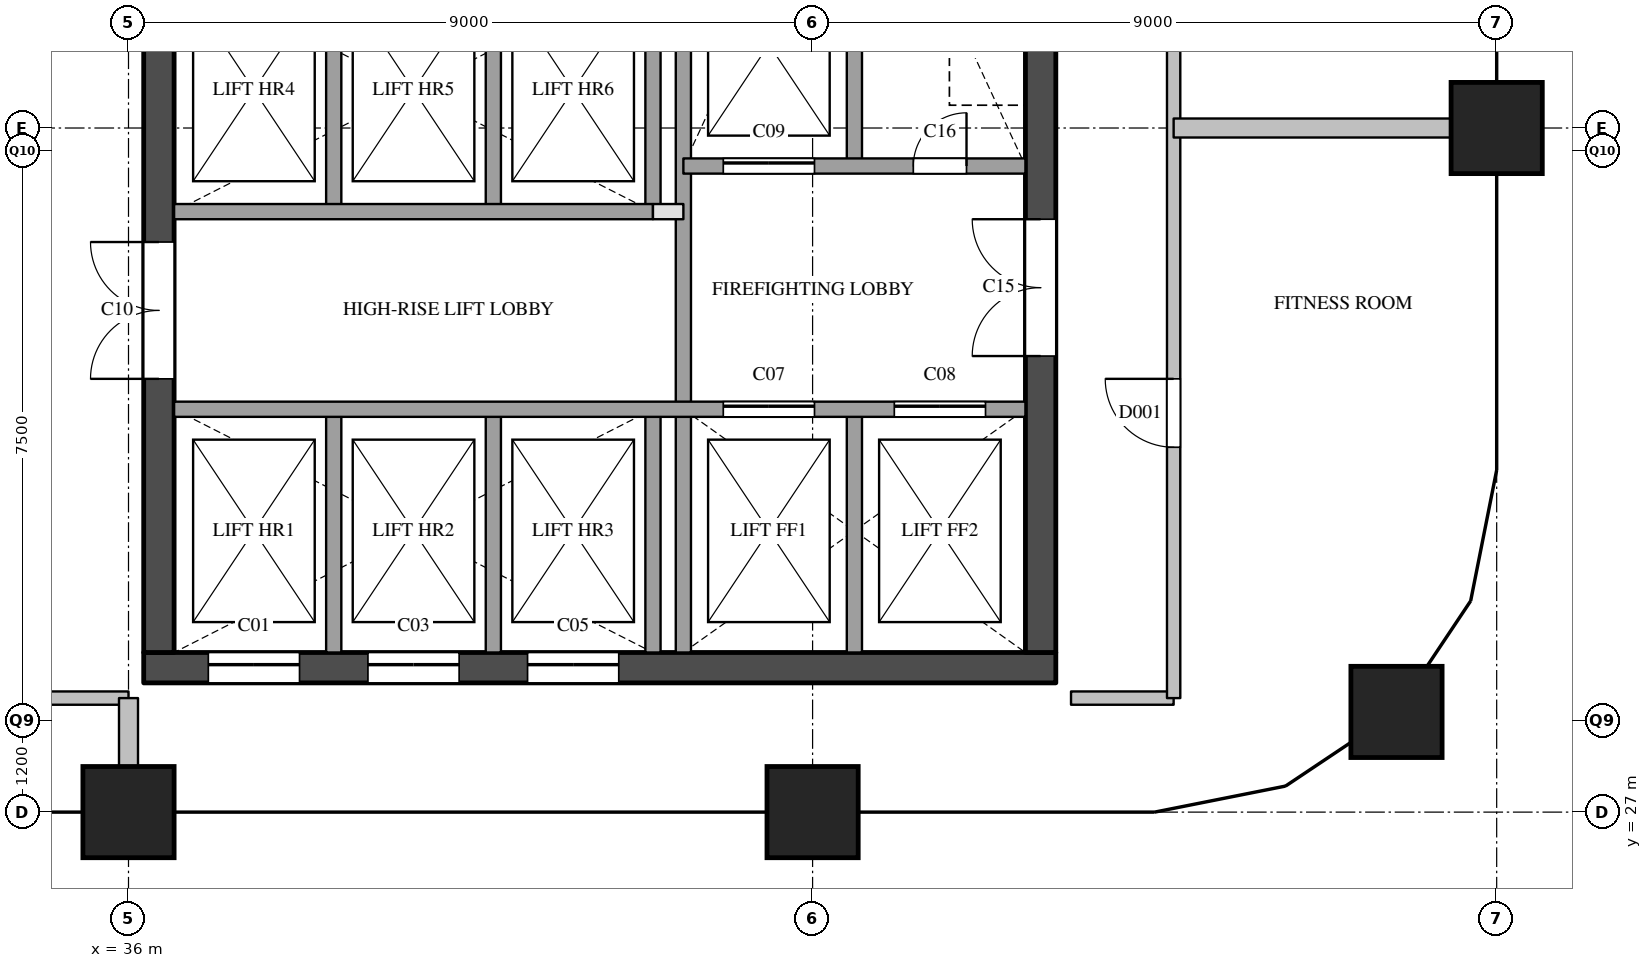
"""IFC4 building model, lengths in metres.
Left out: names, types, materials, properties, quantities, classifications, styles, units other than length and angle.
Written with IfcOpenShell. Run it as: python <this file> out.ifc"""

import sys

from ifc_helpers import new_model, si_unit, direction, frame, frame_2d, origin, origin_2d, place, context, subcontext, project, spatial, rectangle, extrude, element, fill, save


model = new_model("IFC4")
c1 = context("Model", 3, precision=1e-05, world=origin(), true_north=direction((0.0, 1.0)))
c2 = subcontext(c1, "Body", "Model", "MODEL_VIEW")
j1 = project(units=[si_unit("LENGTHUNIT", "METRE"), si_unit("PLANEANGLEUNIT", "RADIAN")], contexts=[c1])
p1 = place(None, origin())
s1 = spatial("IfcSite", under=j1, at=p1, CompositionType="ELEMENT")
p2 = place(p1, origin())
s2 = spatial("IfcBuilding", under=s1, at=p2, CompositionType="ELEMENT")
p3 = place(p2, frame((0.0, 0.0, 285.2)))
s3 = spatial("IfcBuildingStorey", under=s2, at=p3, CompositionType="ELEMENT", Elevation=285.2)
for number, where, z_axis, x_axis in (
    (1, (36.0, 27.0, 0.0), (0.0, 0.0, 1.0), (1.0, 0.0, 0.0)),
    (2, (45.0, 27.0, 0.0), (0.0, 0.0, 1.0), (1.0, 0.0, 0.0)),
    (3, (52.682, 28.318, 0.0), (0.0, 0.0, 1.0), (1.0, 0.0, 0.0)),
    (4, (54.0, 36.0, 0.0), (0.0, 0.0, 1.0), (1.0, 0.0, 0.0)),
):
    element("IfcColumn", number, at=place(p3, frame(where, z_axis=z_axis, x_axis=x_axis)), inside=s3, PredefinedType="COLUMN", context=c2, shape_type="SweptSolid", body=[
        extrude(rectangle(XDim=1.2, YDim=1.2, at=origin_2d()), origin(), (0.0, 0.0, 1.0), 5.0),
    ])
p4 = place(p3, frame((36.2, 28.9, 0.0), z_axis=(0.0, 0.0, 1.0), x_axis=(1.0, 0.0, 0.0)))
e5 = element("IfcWall", 5, at=p4, inside=s3, PredefinedType="SHEAR", context=c2, shape_type="SweptSolid", body=[
    extrude(rectangle(XDim=12.0, YDim=0.4, at=frame_2d((6.0, 0.0))), origin(), (0.0, 0.0, 1.0), 4.7),
])
p5 = place(p4, frame((0.85, 0.0, 0.0)))
e6 = element("IfcOpeningElement", 6, at=p5, cuts=e5, PredefinedType="OPENING", context=c2, shape_type="SweptSolid", body=[
    extrude(rectangle(XDim=1.2, YDim=2.1, at=frame_2d((0.6, 1.05))), frame((0.0, 0.21, 0.0), z_axis=(0.0, -1.0, 0.0), x_axis=(1.0, 0.0, 0.0)), (0.0, 0.0, 1.0), 0.42),
])
p6 = place(p4, frame((2.95, 0.0, 0.0)))
e7 = element("IfcOpeningElement", 7, at=p6, cuts=e5, PredefinedType="OPENING", context=c2, shape_type="SweptSolid", body=[
    extrude(rectangle(XDim=1.2, YDim=2.1, at=frame_2d((0.6, 1.05))), frame((0.0, 0.21, 0.0), z_axis=(0.0, -1.0, 0.0), x_axis=(1.0, 0.0, 0.0)), (0.0, 0.0, 1.0), 0.42),
])
p7 = place(p4, frame((5.05, 0.0, 0.0)))
e8 = element("IfcOpeningElement", 8, at=p7, cuts=e5, PredefinedType="OPENING", context=c2, shape_type="SweptSolid", body=[
    extrude(rectangle(XDim=1.2, YDim=2.1, at=frame_2d((0.6, 1.05))), frame((0.0, 0.21, 0.0), z_axis=(0.0, -1.0, 0.0), x_axis=(1.0, 0.0, 0.0)), (0.0, 0.0, 1.0), 0.42),
])
p8 = place(p3, frame((36.4, 29.1, 0.0), z_axis=(0.0, 0.0, 1.0), x_axis=(0.0, 1.0, 0.0)))
e9 = element("IfcWall", 9, at=p8, inside=s3, PredefinedType="SHEAR", context=c2, shape_type="SweptSolid", body=[
    extrude(rectangle(XDim=20.3, YDim=0.4, at=frame_2d((10.15, 0.0))), origin(), (0.0, 0.0, 1.0), 4.7),
])
p9 = place(p8, frame((3.6, 0.0, 0.0)))
e10 = element("IfcOpeningElement", 10, at=p9, cuts=e9, PredefinedType="OPENING", context=c2, shape_type="SweptSolid", body=[
    extrude(rectangle(XDim=1.8, YDim=2.1, at=frame_2d((0.9, 1.05))), frame((0.0, 0.21, 0.0), z_axis=(0.0, -1.0, 0.0), x_axis=(1.0, 0.0, 0.0)), (0.0, 0.0, 1.0), 0.42),
])
p10 = place(p8, frame((16.4, 0.0, 0.0)))
e11 = element("IfcOpeningElement", 11, at=p10, cuts=e9, PredefinedType="OPENING", context=c2, shape_type="SweptSolid", body=[
    extrude(rectangle(XDim=1.0, YDim=2.1, at=frame_2d((0.5, 1.05))), frame((0.0, 0.21, 0.0), z_axis=(0.0, -1.0, 0.0), x_axis=(1.0, 0.0, 0.0)), (0.0, 0.0, 1.0), 0.42),
])
p11 = place(p3, frame((48.0, 29.1, 0.0), z_axis=(0.0, 0.0, 1.0), x_axis=(0.0, 1.0, 0.0)))
e12 = element("IfcWall", 12, at=p11, inside=s3, PredefinedType="SHEAR", context=c2, shape_type="SweptSolid", body=[
    extrude(rectangle(XDim=20.3, YDim=0.4, at=frame_2d((10.15, 0.0))), origin(), (0.0, 0.0, 1.0), 4.7),
])
p12 = place(p11, frame((12.5, 0.0, 0.0)))
e13 = element("IfcOpeningElement", 13, at=p12, cuts=e12, PredefinedType="OPENING", context=c2, shape_type="SweptSolid", body=[
    extrude(rectangle(XDim=0.7, YDim=2.1, at=frame_2d((0.35, 1.05))), frame((0.0, 0.21, 0.0), z_axis=(0.0, -1.0, 0.0), x_axis=(1.0, 0.0, 0.0)), (0.0, 0.0, 1.0), 0.42),
])
p13 = place(p11, frame((3.9, 0.0, 0.0)))
e14 = element("IfcOpeningElement", 14, at=p13, cuts=e12, PredefinedType="OPENING", context=c2, shape_type="SweptSolid", body=[
    extrude(rectangle(XDim=1.8, YDim=2.1, at=frame_2d((0.9, 1.05))), frame((0.0, 0.21, 0.0), z_axis=(0.0, -1.0, 0.0), x_axis=(1.0, 0.0, 0.0)), (0.0, 0.0, 1.0), 0.42),
])
p14 = place(p3, frame((38.7, 29.1, 0.0), z_axis=(0.0, 0.0, 1.0), x_axis=(0.0, 1.0, 0.0)))
e15 = element("IfcWall", 15, at=p14, inside=s3, PredefinedType="SOLIDWALL", context=c2, shape_type="SweptSolid", body=[
    extrude(rectangle(XDim=3.2, YDim=0.2, at=frame_2d((1.6, 0.0))), origin(), (0.0, 0.0, 1.0), 4.7),
])
p15 = place(p3, frame((38.7, 34.9, 0.0), z_axis=(0.0, 0.0, 1.0), x_axis=(0.0, 1.0, 0.0)))
e16 = element("IfcWall", 16, at=p15, inside=s3, PredefinedType="SOLIDWALL", context=c2, shape_type="SweptSolid", body=[
    extrude(rectangle(XDim=3.2, YDim=0.2, at=frame_2d((1.6, 0.0))), origin(), (0.0, 0.0, 1.0), 4.7),
])
p16 = place(p3, frame((40.8, 29.1, 0.0), z_axis=(0.0, 0.0, 1.0), x_axis=(0.0, 1.0, 0.0)))
e17 = element("IfcWall", 17, at=p16, inside=s3, PredefinedType="SOLIDWALL", context=c2, shape_type="SweptSolid", body=[
    extrude(rectangle(XDim=3.2, YDim=0.2, at=frame_2d((1.6, 0.0))), origin(), (0.0, 0.0, 1.0), 4.7),
])
p17 = place(p3, frame((40.8, 34.9, 0.0), z_axis=(0.0, 0.0, 1.0), x_axis=(0.0, 1.0, 0.0)))
e18 = element("IfcWall", 18, at=p17, inside=s3, PredefinedType="SOLIDWALL", context=c2, shape_type="SweptSolid", body=[
    extrude(rectangle(XDim=3.2, YDim=0.2, at=frame_2d((1.6, 0.0))), origin(), (0.0, 0.0, 1.0), 4.7),
])
p18 = place(p3, frame((42.9, 29.1, 0.0), z_axis=(0.0, 0.0, 1.0), x_axis=(0.0, 1.0, 0.0)))
e19 = element("IfcWall", 19, at=p18, inside=s3, PredefinedType="SOLIDWALL", context=c2, shape_type="SweptSolid", body=[
    extrude(rectangle(XDim=3.2, YDim=0.2, at=frame_2d((1.6, 0.0))), origin(), (0.0, 0.0, 1.0), 4.7),
])
p19 = place(p3, frame((42.9, 34.9, 0.0), z_axis=(0.0, 0.0, 1.0), x_axis=(0.0, 1.0, 0.0)))
e20 = element("IfcWall", 20, at=p19, inside=s3, PredefinedType="SOLIDWALL", context=c2, shape_type="SweptSolid", body=[
    extrude(rectangle(XDim=3.2, YDim=0.2, at=frame_2d((1.6, 0.0))), origin(), (0.0, 0.0, 1.0), 4.7),
])
p20 = place(p3, frame((43.3, 29.1, 0.0), z_axis=(0.0, 0.0, 1.0), x_axis=(0.0, 1.0, 0.0)))
e21 = element("IfcWall", 21, at=p20, inside=s3, PredefinedType="SOLIDWALL", context=c2, shape_type="SweptSolid", body=[
    extrude(rectangle(XDim=9.9, YDim=0.2, at=frame_2d((4.95, 0.0))), origin(), (0.0, 0.0, 1.0), 4.7),
])
for number, where, z_axis, x_axis in (
    (22, (45.55, 29.1, 0.0), (0.0, 0.0, 1.0), (0.0, 1.0, 0.0)),
    (23, (45.55, 35.5, 0.0), (0.0, 0.0, 1.0), (0.0, 1.0, 0.0)),
):
    element("IfcWall", number, at=place(p3, frame(where, z_axis=z_axis, x_axis=x_axis)), inside=s3, PredefinedType="SOLIDWALL", context=c2, shape_type="SweptSolid", body=[
        extrude(rectangle(XDim=3.2, YDim=0.2, at=frame_2d((1.6, 0.0))), origin(), (0.0, 0.0, 1.0), 4.7),
    ])
p21 = place(p3, frame((36.6, 32.3, 0.0), z_axis=(0.0, 0.0, 1.0), x_axis=(1.0, 0.0, 0.0)))
e24 = element("IfcWall", 24, at=p21, inside=s3, PredefinedType="SOLIDWALL", context=c2, shape_type="SweptSolid", body=[
    extrude(rectangle(XDim=11.2, YDim=0.2, at=frame_2d((5.6, 0.0))), origin(), (0.0, 0.0, 1.0), 4.7),
])
p22 = place(p21, frame((7.225, 0.0, 0.0)))
e25 = element("IfcOpeningElement", 25, at=p22, cuts=e24, PredefinedType="OPENING", context=c2, shape_type="SweptSolid", body=[
    extrude(rectangle(XDim=1.2, YDim=2.1, at=frame_2d((0.6, 1.05))), frame((0.0, 0.11, 0.0), z_axis=(0.0, -1.0, 0.0), x_axis=(1.0, 0.0, 0.0)), (0.0, 0.0, 1.0), 0.22),
])
p23 = place(p21, frame((9.475, 0.0, 0.0)))
e26 = element("IfcOpeningElement", 26, at=p23, cuts=e24, PredefinedType="OPENING", context=c2, shape_type="SweptSolid", body=[
    extrude(rectangle(XDim=1.2, YDim=2.1, at=frame_2d((0.6, 1.05))), frame((0.0, 0.11, 0.0), z_axis=(0.0, -1.0, 0.0), x_axis=(1.0, 0.0, 0.0)), (0.0, 0.0, 1.0), 0.22),
])
p24 = place(p3, frame((42.9, 34.9, 0.0), z_axis=(0.0, 0.0, 1.0), x_axis=(1.0, 0.0, 0.0)))
e27 = element("IfcWall", 27, at=p24, inside=s3, PredefinedType="PARTITIONING", context=c2, shape_type="SweptSolid", body=[
    extrude(rectangle(XDim=0.4, YDim=0.2, at=frame_2d((0.2, 0.0))), origin(), (0.0, 0.0, 1.0), 4.7),
])
p25 = place(p3, frame((36.6, 34.9, 0.0), z_axis=(0.0, 0.0, 1.0), x_axis=(1.0, 0.0, 0.0)))
e28 = element("IfcWall", 28, at=p25, inside=s3, PredefinedType="SOLIDWALL", context=c2, shape_type="SweptSolid", body=[
    extrude(rectangle(XDim=6.3, YDim=0.2, at=frame_2d((3.15, 0.0))), origin(), (0.0, 0.0, 1.0), 4.7),
])
p26 = place(p3, frame((43.3, 35.5, 0.0), z_axis=(0.0, 0.0, 1.0), x_axis=(1.0, 0.0, 0.0)))
e29 = element("IfcWall", 29, at=p26, inside=s3, PredefinedType="SOLIDWALL", context=c2, shape_type="SweptSolid", body=[
    extrude(rectangle(XDim=4.5, YDim=0.2, at=frame_2d((2.25, 0.0))), origin(), (0.0, 0.0, 1.0), 4.7),
])
p27 = place(p26, frame((0.525, 0.0, 0.0)))
e30 = element("IfcOpeningElement", 30, at=p27, cuts=e29, PredefinedType="OPENING", context=c2, shape_type="SweptSolid", body=[
    extrude(rectangle(XDim=1.2, YDim=2.1, at=frame_2d((0.6, 1.05))), frame((0.0, 0.11, 0.0), z_axis=(0.0, -1.0, 0.0), x_axis=(1.0, 0.0, 0.0)), (0.0, 0.0, 1.0), 0.22),
])
p28 = place(p26, frame((3.025, 0.0, 0.0)))
e31 = element("IfcOpeningElement", 31, at=p28, cuts=e29, PredefinedType="OPENING", context=c2, shape_type="SweptSolid", body=[
    extrude(rectangle(XDim=0.7, YDim=2.1, at=frame_2d((0.35, 1.05))), frame((0.0, 0.11, 0.0), z_axis=(0.0, -1.0, 0.0), x_axis=(1.0, 0.0, 0.0)), (0.0, 0.0, 1.0), 0.22),
])
for number, where, z_axis, x_axis in (
    (32, (34.65, 28.5, 0.0), (0.0, 0.0, 1.0), (1.0, 0.0, 0.0)),
    (33, (48.4, 28.5, 0.0), (0.0, 0.0, 1.0), (1.0, 0.0, 0.0)),
):
    element("IfcWall", number, at=place(p3, frame(where, z_axis=z_axis, x_axis=x_axis)), inside=s3, PredefinedType="PARTITIONING", context=c2, shape_type="SweptSolid", body=[
        extrude(rectangle(XDim=1.35, YDim=0.175, at=frame_2d((0.675, 0.0))), origin(), (0.0, 0.0, 1.0), 4.7),
    ])
p29 = place(p3, frame((49.75, 28.5, 0.0), z_axis=(0.0, 0.0, 1.0), x_axis=(0.0, 1.0, 0.0)))
e34 = element("IfcWall", 34, at=p29, inside=s3, PredefinedType="PARTITIONING", context=c2, shape_type="SweptSolid", body=[
    extrude(rectangle(XDim=22.85, YDim=0.175, at=frame_2d((11.425, 0.0))), origin(), (0.0, 0.0, 1.0), 4.7),
])
p30 = place(p29, frame((3.3, 0.0, 0.0)))
e35 = element("IfcOpeningElement", 35, at=p30, cuts=e34, PredefinedType="OPENING", context=c2, shape_type="SweptSolid", body=[
    extrude(rectangle(XDim=0.9, YDim=2.1, at=frame_2d((0.45, 1.05))), frame((0.0, 0.097, 0.0), z_axis=(0.0, -1.0, 0.0), x_axis=(1.0, 0.0, 0.0)), (0.0, 0.0, 1.0), 0.195),
])
p31 = place(p29, frame((12.45, 0.0, 0.0)))
e36 = element("IfcOpeningElement", 36, at=p31, cuts=e34, PredefinedType="OPENING", context=c2, shape_type="SweptSolid", body=[
    extrude(rectangle(XDim=0.9, YDim=2.1, at=frame_2d((0.45, 1.05))), frame((0.0, 0.097, 0.0), z_axis=(0.0, -1.0, 0.0), x_axis=(1.0, 0.0, 0.0)), (0.0, 0.0, 1.0), 0.195),
])
p32 = place(p29, frame((20.125, 0.0, 0.0)))
e37 = element("IfcOpeningElement", 37, at=p32, cuts=e34, PredefinedType="OPENING", context=c2, shape_type="SweptSolid", body=[
    extrude(rectangle(XDim=0.9, YDim=2.1, at=frame_2d((0.45, 1.05))), frame((0.0, 0.097, 0.0), z_axis=(0.0, -1.0, 0.0), x_axis=(1.0, 0.0, 0.0)), (0.0, 0.0, 1.0), 0.195),
])
p33 = place(p3, frame((49.75, 36.0, 0.0), z_axis=(0.0, 0.0, 1.0), x_axis=(1.0, 0.0, 0.0)))
e38 = element("IfcWall", 38, at=p33, inside=s3, PredefinedType="PARTITIONING", context=c2, shape_type="SweptSolid", body=[
    extrude(rectangle(XDim=4.25, YDim=0.25, at=frame_2d((2.125, 0.0))), origin(), (0.0, 0.0, 1.0), 4.7),
])
p34 = place(p3, frame((36.0, 27.0, 0.0), z_axis=(0.0, 0.0, 1.0), x_axis=(0.0, 1.0, 0.0)))
e39 = element("IfcWall", 39, at=p34, inside=s3, PredefinedType="PARTITIONING", context=c2, shape_type="SweptSolid", body=[
    extrude(rectangle(XDim=1.5, YDim=0.25, at=frame_2d((0.75, 0.0))), origin(), (0.0, 0.0, 1.0), 4.7),
])
p35 = place(p5, origin())
e40 = element("IfcDoor", 40, at=p35, inside=s3, OperationType="SLIDING_TO_LEFT", PredefinedType="DOOR", context=c2, shape_type="SweptSolid", body=[
    extrude(rectangle(XDim=1.2, YDim=2.1, at=frame_2d((0.6, 1.05))), frame((0.0, 0.025, 0.0), z_axis=(0.0, -1.0, 0.0), x_axis=(1.0, 0.0, 0.0)), (0.0, 0.0, 1.0), 0.05),
])
fill(e6, e40)
p36 = place(p6, origin())
e41 = element("IfcDoor", 41, at=p36, inside=s3, OperationType="SLIDING_TO_LEFT", PredefinedType="DOOR", context=c2, shape_type="SweptSolid", body=[
    extrude(rectangle(XDim=1.2, YDim=2.1, at=frame_2d((0.6, 1.05))), frame((0.0, 0.025, 0.0), z_axis=(0.0, -1.0, 0.0), x_axis=(1.0, 0.0, 0.0)), (0.0, 0.0, 1.0), 0.05),
])
fill(e7, e41)
p37 = place(p7, origin())
e42 = element("IfcDoor", 42, at=p37, inside=s3, OperationType="SLIDING_TO_LEFT", PredefinedType="DOOR", context=c2, shape_type="SweptSolid", body=[
    extrude(rectangle(XDim=1.2, YDim=2.1, at=frame_2d((0.6, 1.05))), frame((0.0, 0.025, 0.0), z_axis=(0.0, -1.0, 0.0), x_axis=(1.0, 0.0, 0.0)), (0.0, 0.0, 1.0), 0.05),
])
fill(e8, e42)
p38 = place(p22, origin())
e43 = element("IfcDoor", 43, at=p38, inside=s3, OperationType="SLIDING_TO_LEFT", PredefinedType="DOOR", context=c2, shape_type="SweptSolid", body=[
    extrude(rectangle(XDim=1.2, YDim=2.1, at=frame_2d((0.6, 1.05))), frame((0.0, 0.025, 0.0), z_axis=(0.0, -1.0, 0.0), x_axis=(1.0, 0.0, 0.0)), (0.0, 0.0, 1.0), 0.05),
])
fill(e25, e43)
p39 = place(p23, origin())
e44 = element("IfcDoor", 44, at=p39, inside=s3, OperationType="SLIDING_TO_LEFT", PredefinedType="DOOR", context=c2, shape_type="SweptSolid", body=[
    extrude(rectangle(XDim=1.2, YDim=2.1, at=frame_2d((0.6, 1.05))), frame((0.0, 0.025, 0.0), z_axis=(0.0, -1.0, 0.0), x_axis=(1.0, 0.0, 0.0)), (0.0, 0.0, 1.0), 0.05),
])
fill(e26, e44)
p40 = place(p27, origin())
e45 = element("IfcDoor", 45, at=p40, inside=s3, OperationType="SLIDING_TO_LEFT", PredefinedType="DOOR", context=c2, shape_type="SweptSolid", body=[
    extrude(rectangle(XDim=1.2, YDim=2.1, at=frame_2d((0.6, 1.05))), frame((0.0, 0.025, 0.0), z_axis=(0.0, -1.0, 0.0), x_axis=(1.0, 0.0, 0.0)), (0.0, 0.0, 1.0), 0.05),
])
fill(e30, e45)
p41 = place(p9, origin())
e46 = element("IfcDoor", 46, at=p41, inside=s3, OperationType="DOUBLE_DOOR_SINGLE_SWING", PredefinedType="DOOR", context=c2, shape_type="SweptSolid", body=[
    extrude(rectangle(XDim=1.8, YDim=2.1, at=frame_2d((0.9, 1.05))), frame((0.0, 0.025, 0.0), z_axis=(0.0, -1.0, 0.0), x_axis=(1.0, 0.0, 0.0)), (0.0, 0.0, 1.0), 0.05),
])
fill(e10, e46)
p42 = place(p13, origin())
e47 = element("IfcDoor", 47, at=p42, inside=s3, OperationType="DOUBLE_DOOR_SINGLE_SWING", PredefinedType="DOOR", context=c2, shape_type="SweptSolid", body=[
    extrude(rectangle(XDim=1.8, YDim=2.1, at=frame_2d((0.9, 1.05))), frame((0.0, 0.025, 0.0), z_axis=(0.0, -1.0, 0.0), x_axis=(1.0, 0.0, 0.0)), (0.0, 0.0, 1.0), 0.05),
])
fill(e14, e47)
p43 = place(p28, origin())
e48 = element("IfcDoor", 48, at=p43, inside=s3, OperationType="SINGLE_SWING_RIGHT", PredefinedType="DOOR", context=c2, shape_type="SweptSolid", body=[
    extrude(rectangle(XDim=0.7, YDim=2.1, at=frame_2d((0.35, 1.05))), frame((0.0, 0.025, 0.0), z_axis=(0.0, -1.0, 0.0), x_axis=(1.0, 0.0, 0.0)), (0.0, 0.0, 1.0), 0.05),
])
fill(e31, e48)
p44 = place(p30, origin())
e49 = element("IfcDoor", 49, at=p44, inside=s3, OperationType="SINGLE_SWING_RIGHT", PredefinedType="DOOR", context=c2, shape_type="SweptSolid", body=[
    extrude(rectangle(XDim=0.9, YDim=2.1, at=frame_2d((0.45, 1.05))), frame((0.0, 0.025, 0.0), z_axis=(0.0, -1.0, 0.0), x_axis=(1.0, 0.0, 0.0)), (0.0, 0.0, 1.0), 0.05),
])
fill(e35, e49)
save(model, sys.argv[1])
